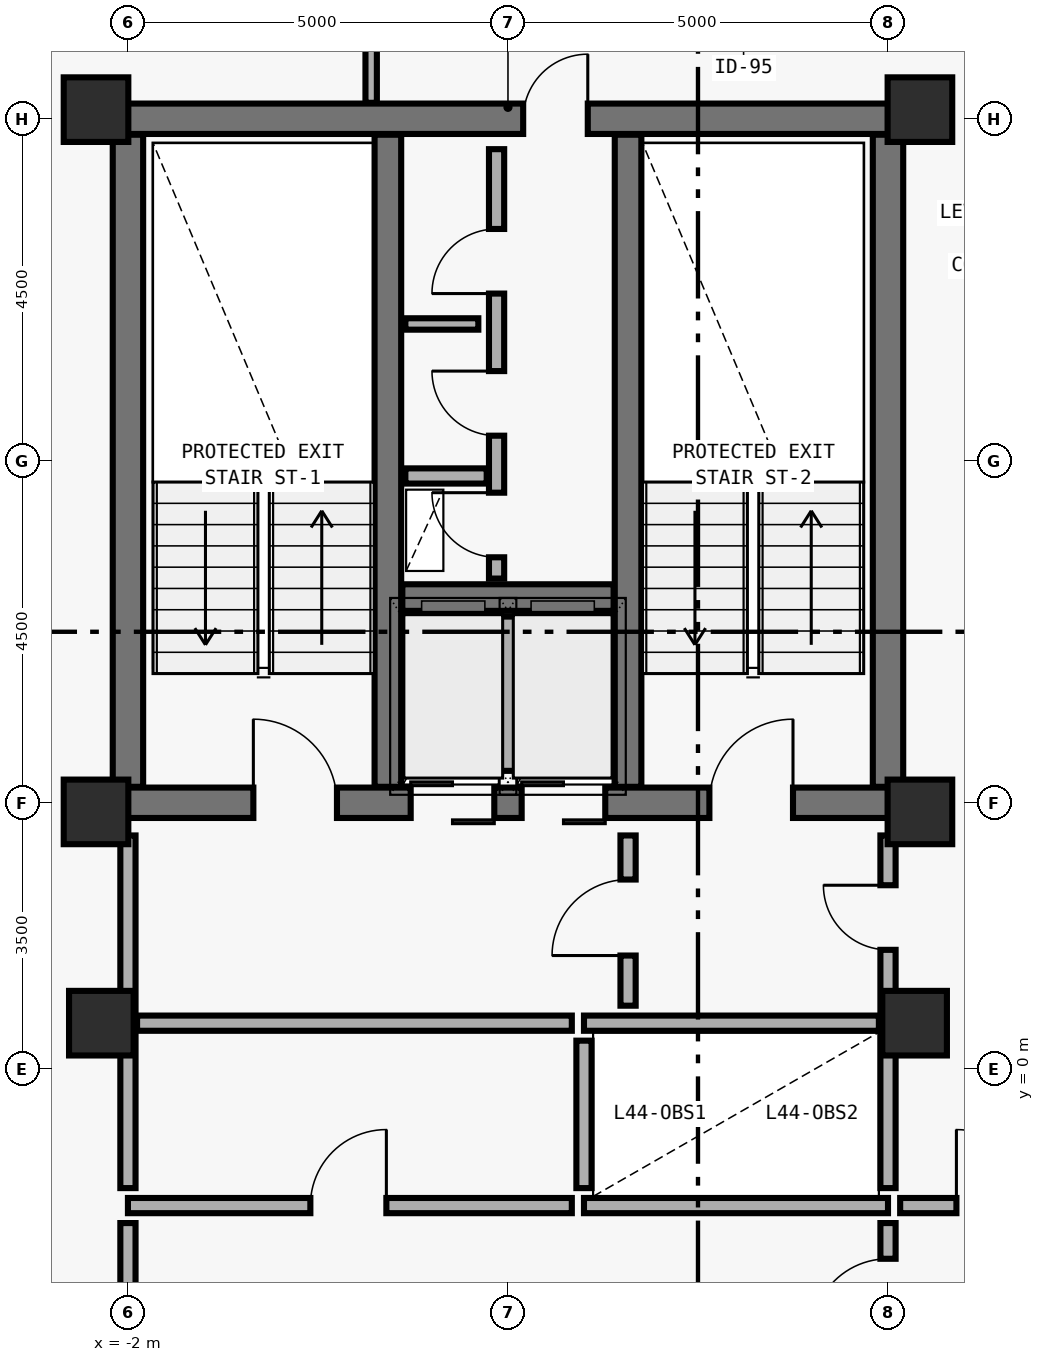
"""IFC4 building model, lengths in metres.
Left out: names, types, materials, properties, quantities, classifications, styles, units other than length and angle.
Written with IfcOpenShell. Run it as: python <this file> out.ifc"""

import sys

from ifc_helpers import new_model, si_unit, direction, frame, frame_2d, origin, origin_2d, place, context, subcontext, project, spatial, rectangle, extrude, element, fill, save


model = new_model("IFC4")
c1 = context("Model", 3, precision=1e-05, world=origin(), true_north=direction((0.0, 1.0)))
c2 = subcontext(c1, "Body", "Model", "MODEL_VIEW")
j1 = project(units=[si_unit("LENGTHUNIT", "METRE"), si_unit("PLANEANGLEUNIT", "RADIAN")], contexts=[c1])
p1 = place(None, origin())
s1 = spatial("IfcSite", under=j1, at=p1, CompositionType="ELEMENT")
p2 = place(p1, origin())
s2 = spatial("IfcBuilding", under=s1, at=p2, CompositionType="ELEMENT")
p3 = place(p2, frame((0.0, 0.0, 178.8)))
s3 = spatial("IfcBuildingStorey", under=s2, at=p3, CompositionType="ELEMENT", Elevation=178.8)
p4 = place(p3, frame((-2.0, 3.5, 0.0), z_axis=(0.0, 0.0, 1.0), x_axis=(1.0, 0.0, 0.0)))
e1 = element("IfcWall", 1, at=p4, inside=s3, PredefinedType="SHEAR", context=c2, shape_type="SweptSolid", body=[
    extrude(rectangle(XDim=10.0, YDim=0.4, at=frame_2d((5.0, 0.0))), origin(), (0.0, 0.0, 1.0), 3.592),
])
p5 = place(p4, frame((1.65, 0.0, 0.0)))
e2 = element("IfcOpeningElement", 2, at=p5, cuts=e1, PredefinedType="OPENING", context=c2, shape_type="SweptSolid", body=[
    extrude(rectangle(XDim=1.1, YDim=2.15, at=frame_2d((0.55, 1.075))), frame((0.0, 0.21, 0.0), z_axis=(0.0, -1.0, 0.0), x_axis=(1.0, 0.0, 0.0)), (0.0, 0.0, 1.0), 0.42),
])
p6 = place(p4, frame((7.65, 0.0, 0.0)))
e3 = element("IfcOpeningElement", 3, at=p6, cuts=e1, PredefinedType="OPENING", context=c2, shape_type="SweptSolid", body=[
    extrude(rectangle(XDim=1.1, YDim=2.15, at=frame_2d((0.55, 1.075))), frame((0.0, 0.21, 0.0), z_axis=(0.0, -1.0, 0.0), x_axis=(1.0, 0.0, 0.0)), (0.0, 0.0, 1.0), 0.42),
])
p7 = place(p4, frame((3.72, 0.0, 0.0)))
e4 = element("IfcOpeningElement", 4, at=p7, cuts=e1, PredefinedType="OPENING", context=c2, shape_type="SweptSolid", body=[
    extrude(rectangle(XDim=1.1, YDim=2.2, at=frame_2d((0.55, 1.1))), frame((0.0, 0.21, 0.0), z_axis=(0.0, -1.0, 0.0), x_axis=(1.0, 0.0, 0.0)), (0.0, 0.0, 1.0), 0.42),
])
p8 = place(p4, frame((5.18, 0.0, 0.0)))
e5 = element("IfcOpeningElement", 5, at=p8, cuts=e1, PredefinedType="OPENING", context=c2, shape_type="SweptSolid", body=[
    extrude(rectangle(XDim=1.1, YDim=2.2, at=frame_2d((0.55, 1.1))), frame((0.0, 0.21, 0.0), z_axis=(0.0, -1.0, 0.0), x_axis=(1.0, 0.0, 0.0)), (0.0, 0.0, 1.0), 0.42),
])
p9 = place(p3, frame((-2.0, 12.5, 0.0), z_axis=(0.0, 0.0, 1.0), x_axis=(1.0, 0.0, 0.0)))
e6 = element("IfcWall", 6, at=p9, inside=s3, PredefinedType="SHEAR", context=c2, shape_type="SweptSolid", body=[
    extrude(rectangle(XDim=10.0, YDim=0.4, at=frame_2d((5.0, 0.0))), origin(), (0.0, 0.0, 1.0), 3.592),
])
p10 = place(p9, frame((5.2, 0.0, 0.0)))
e7 = element("IfcOpeningElement", 7, at=p10, cuts=e6, PredefinedType="OPENING", context=c2, shape_type="SweptSolid", body=[
    extrude(rectangle(XDim=0.85, YDim=2.1, at=frame_2d((0.425, 1.05))), frame((0.0, 0.21, 0.0), z_axis=(0.0, -1.0, 0.0), x_axis=(1.0, 0.0, 0.0)), (0.0, 0.0, 1.0), 0.42),
])
for number, where, z_axis, x_axis in (
    (8, (-2.0, 3.71, 0.0), (0.0, 0.0, 1.0), (0.0, 1.0, 0.0)),
    (9, (8.0, 3.71, 0.0), (0.0, 0.0, 1.0), (0.0, 1.0, 0.0)),
):
    element("IfcWall", number, at=place(p3, frame(where, z_axis=z_axis, x_axis=x_axis)), inside=s3, PredefinedType="SHEAR", context=c2, shape_type="SweptSolid", body=[
        extrude(rectangle(XDim=8.58, YDim=0.4, at=frame_2d((4.29, 0.0))), origin(), (0.0, 0.0, 1.0), 3.592),
    ])
for number, where, z_axis, x_axis in (
    (10, (1.42, 3.71, 0.0), (0.0, 0.0, 1.0), (0.0, 1.0, 0.0)),
    (11, (4.58, 3.71, 0.0), (0.0, 0.0, 1.0), (0.0, 1.0, 0.0)),
):
    element("IfcWall", number, at=place(p3, frame(where, z_axis=z_axis, x_axis=x_axis)), inside=s3, PredefinedType="SHEAR", context=c2, shape_type="SweptSolid", body=[
        extrude(rectangle(XDim=8.58, YDim=0.35, at=frame_2d((4.29, 0.0))), origin(), (0.0, 0.0, 1.0), 3.592),
    ])
p11 = place(p3, frame((1.61, 6.2, 0.0), z_axis=(0.0, 0.0, 1.0), x_axis=(1.0, 0.0, 0.0)))
e12 = element("IfcWall", 12, at=p11, inside=s3, PredefinedType="SHEAR", context=c2, shape_type="SweptSolid", body=[
    extrude(rectangle(XDim=2.78, YDim=0.35, at=frame_2d((1.39, 0.0))), origin(), (0.0, 0.0, 1.0), 3.592),
])
for number, where, z_axis, x_axis in (
    (13, (-2.42, 12.62, 0.0), (0.0, 0.0, 1.0), (1.0, 0.0, 0.0)),
    (14, (8.42, 12.62, 0.0), (0.0, 0.0, 1.0), (1.0, 0.0, 0.0)),
    (15, (-2.42, 3.38, 0.0), (0.0, 0.0, 1.0), (1.0, 0.0, 0.0)),
    (16, (8.42, 3.38, 0.0), (0.0, 0.0, 1.0), (1.0, 0.0, 0.0)),
    (17, (-2.35, 0.6, 0.0), (0.0, 0.0, 1.0), (1.0, 0.0, 0.0)),
    (18, (8.35, 0.6, 0.0), (0.0, 0.0, 1.0), (1.0, 0.0, 0.0)),
):
    element("IfcColumn", number, at=place(p3, frame(where, z_axis=z_axis, x_axis=x_axis)), inside=s3, PredefinedType="COLUMN", context=c2, shape_type="SweptSolid", body=[
        extrude(rectangle(XDim=0.85, YDim=0.85, at=origin_2d()), origin(), (0.0, 0.0, 1.0), 3.575),
    ])
p12 = place(p3, frame((3.0, 3.92, 0.0), z_axis=(0.0, 0.0, 1.0), x_axis=(0.0, 1.0, 0.0)))
e19 = element("IfcWall", 19, at=p12, inside=s3, PredefinedType="SOLIDWALL", context=c2, shape_type="SweptSolid", body=[
    extrude(rectangle(XDim=2.03, YDim=0.2, at=frame_2d((1.015, 0.0))), origin(), (0.0, 0.0, 1.0), 3.36),
])
p13 = place(p3, frame((1.65, 7.8, 0.0), z_axis=(0.0, 0.0, 1.0), x_axis=(1.0, 0.0, 0.0)))
e20 = element("IfcWall", 20, at=p13, inside=s3, PredefinedType="SOLIDWALL", context=c2, shape_type="SweptSolid", body=[
    extrude(rectangle(XDim=1.07, YDim=0.2, at=frame_2d((0.535, 0.0))), origin(), (0.0, 0.0, 1.0), 3.36),
])
p14 = place(p3, frame((4.0, 0.6, 0.0), z_axis=(0.0, 0.0, 1.0), x_axis=(1.0, 0.0, 0.0)))
e21 = element("IfcWall", 21, at=p14, inside=s3, PredefinedType="SOLIDWALL", context=c2, shape_type="SweptSolid", body=[
    extrude(rectangle(XDim=3.88, YDim=0.2, at=frame_2d((1.94, 0.0))), origin(), (0.0, 0.0, 1.0), 3.012),
])
p15 = place(p3, frame((4.0, -1.8, 0.0), z_axis=(0.0, 0.0, 1.0), x_axis=(1.0, 0.0, 0.0)))
e22 = element("IfcWall", 22, at=p15, inside=s3, PredefinedType="SOLIDWALL", context=c2, shape_type="SweptSolid", body=[
    extrude(rectangle(XDim=4.0, YDim=0.2, at=frame_2d((2.0, 0.0))), origin(), (0.0, 0.0, 1.0), 3.36),
])
p16 = place(p3, frame((4.0, -1.57, 0.0), z_axis=(0.0, 0.0, 1.0), x_axis=(0.0, 1.0, 0.0)))
e23 = element("IfcWall", 23, at=p16, inside=s3, PredefinedType="SOLIDWALL", context=c2, shape_type="SweptSolid", body=[
    extrude(rectangle(XDim=1.94, YDim=0.2, at=frame_2d((0.97, 0.0))), origin(), (0.0, 0.0, 1.0), 3.36),
])
p17 = place(p3, frame((8.0, -1.57, 0.0), z_axis=(0.0, 0.0, 1.0), x_axis=(0.0, 1.0, 0.0)))
e24 = element("IfcWall", 24, at=p17, inside=s3, PredefinedType="SOLIDWALL", context=c2, shape_type="SweptSolid", body=[
    extrude(rectangle(XDim=2.05, YDim=0.2, at=frame_2d((1.025, 0.0))), origin(), (0.0, 0.0, 1.0), 3.012),
])
p18 = place(p3, frame((2.85, 6.45, 0.0), z_axis=(0.0, 0.0, 1.0), x_axis=(0.0, 1.0, 0.0)))
e25 = element("IfcWall", 25, at=p18, inside=s3, PredefinedType="MOVABLE", context=c2, shape_type="SweptSolid", body=[
    extrude(rectangle(XDim=5.65, YDim=0.2, at=frame_2d((2.825, 0.0))), origin(), (0.0, 0.0, 1.0), 3.36),
])
p19 = place(p18, frame((1.88, 0.0, 0.0)))
e26 = element("IfcOpeningElement", 26, at=p19, cuts=e25, PredefinedType="OPENING", context=c2, shape_type="SweptSolid", body=[
    extrude(rectangle(XDim=0.85, YDim=2.05, at=frame_2d((0.425, 1.025))), frame((0.0, 0.11, 0.0), z_axis=(0.0, -1.0, 0.0), x_axis=(1.0, 0.0, 0.0)), (0.0, 0.0, 1.0), 0.22),
])
p20 = place(p18, frame((3.75, 0.0, 0.0)))
e27 = element("IfcOpeningElement", 27, at=p20, cuts=e25, PredefinedType="OPENING", context=c2, shape_type="SweptSolid", body=[
    extrude(rectangle(XDim=0.85, YDim=2.1, at=frame_2d((0.425, 1.05))), frame((0.0, 0.11, 0.0), z_axis=(0.0, -1.0, 0.0), x_axis=(1.0, 0.0, 0.0)), (0.0, 0.0, 1.0), 0.22),
])
p21 = place(p18, frame((0.28, 0.0, 0.0)))
e28 = element("IfcOpeningElement", 28, at=p21, cuts=e25, PredefinedType="OPENING", context=c2, shape_type="SweptSolid", body=[
    extrude(rectangle(XDim=0.85, YDim=2.1, at=frame_2d((0.425, 1.05))), frame((0.0, 0.11, 0.0), z_axis=(0.0, -1.0, 0.0), x_axis=(1.0, 0.0, 0.0)), (0.0, 0.0, 1.0), 0.22),
])
p22 = place(p3, frame((4.58, 0.83, 0.0), z_axis=(0.0, 0.0, 1.0), x_axis=(0.0, 1.0, 0.0)))
e29 = element("IfcWall", 29, at=p22, inside=s3, PredefinedType="MOVABLE", context=c2, shape_type="SweptSolid", body=[
    extrude(rectangle(XDim=2.24, YDim=0.2, at=frame_2d((1.12, 0.0))), origin(), (0.0, 0.0, 1.0), 3.36),
])
p23 = place(p22, frame((0.66, 0.0, 0.0)))
e30 = element("IfcOpeningElement", 30, at=p23, cuts=e29, PredefinedType="OPENING", context=c2, shape_type="SweptSolid", body=[
    extrude(rectangle(XDim=1.0, YDim=2.1, at=frame_2d((0.5, 1.05))), frame((0.0, 0.11, 0.0), z_axis=(0.0, -1.0, 0.0), x_axis=(1.0, 0.0, 0.0)), (0.0, 0.0, 1.0), 0.22),
])
p24 = place(p3, frame((8.0, 0.72, 0.0), z_axis=(0.0, 0.0, 1.0), x_axis=(0.0, 1.0, 0.0)))
e31 = element("IfcWall", 31, at=p24, inside=s3, PredefinedType="MOVABLE", context=c2, shape_type="SweptSolid", body=[
    extrude(rectangle(XDim=2.35, YDim=0.2, at=frame_2d((1.175, 0.0))), origin(), (0.0, 0.0, 1.0), 2.692),
])
p25 = place(p24, frame((0.845, 0.0, 0.0)))
e32 = element("IfcOpeningElement", 32, at=p25, cuts=e31, PredefinedType="OPENING", context=c2, shape_type="SweptSolid", body=[
    extrude(rectangle(XDim=0.85, YDim=2.1, at=frame_2d((0.425, 1.05))), frame((0.0, 0.11, 0.0), z_axis=(0.0, -1.0, 0.0), x_axis=(1.0, 0.0, 0.0)), (0.0, 0.0, 1.0), 0.22),
])
p26 = place(p3, frame((8.0, -3.97, 0.0), z_axis=(0.0, 0.0, 1.0), x_axis=(0.0, 1.0, 0.0)))
e33 = element("IfcWall", 33, at=p26, inside=s3, PredefinedType="MOVABLE", context=c2, shape_type="SweptSolid", body=[
    extrude(rectangle(XDim=1.94, YDim=0.2, at=frame_2d((0.97, 0.0))), origin(), (0.0, 0.0, 1.0), 3.012),
])
p27 = place(p26, frame((0.47, 0.0, 0.0)))
e34 = element("IfcOpeningElement", 34, at=p27, cuts=e33, PredefinedType="OPENING", context=c2, shape_type="SweptSolid", body=[
    extrude(rectangle(XDim=1.0, YDim=2.1, at=frame_2d((0.5, 1.05))), frame((0.0, 0.11, 0.0), z_axis=(0.0, -1.0, 0.0), x_axis=(1.0, 0.0, 0.0)), (0.0, 0.0, 1.0), 0.22),
])
p28 = place(p3, frame((-2.0, -1.8, 0.0), z_axis=(0.0, 0.0, 1.0), x_axis=(1.0, 0.0, 0.0)))
e35 = element("IfcWall", 35, at=p28, inside=s3, PredefinedType="MOVABLE", context=c2, shape_type="SweptSolid", body=[
    extrude(rectangle(XDim=5.84, YDim=0.2, at=frame_2d((2.92, 0.0))), origin(), (0.0, 0.0, 1.0), 3.36),
])
p29 = place(p28, frame((2.4, 0.0, 0.0)))
e36 = element("IfcOpeningElement", 36, at=p29, cuts=e35, PredefinedType="OPENING", context=c2, shape_type="SweptSolid", body=[
    extrude(rectangle(XDim=1.0, YDim=2.1, at=frame_2d((0.5, 1.05))), frame((0.0, 0.11, 0.0), z_axis=(0.0, -1.0, 0.0), x_axis=(1.0, 0.0, 0.0)), (0.0, 0.0, 1.0), 0.22),
])
p30 = place(p3, frame((8.16, -1.8, 0.0), z_axis=(0.0, 0.0, 1.0), x_axis=(1.0, 0.0, 0.0)))
e37 = element("IfcWall", 37, at=p30, inside=s3, PredefinedType="MOVABLE", context=c2, shape_type="SweptSolid", body=[
    extrude(rectangle(XDim=2.64, YDim=0.2, at=frame_2d((1.32, 0.0))), origin(), (0.0, 0.0, 1.0), 3.36),
])
p31 = place(p30, frame((0.74, 0.0, 0.0)))
e38 = element("IfcOpeningElement", 38, at=p31, cuts=e37, PredefinedType="OPENING", context=c2, shape_type="SweptSolid", body=[
    extrude(rectangle(XDim=1.0, YDim=2.1, at=frame_2d((0.5, 1.05))), frame((0.0, 0.11, 0.0), z_axis=(0.0, -1.0, 0.0), x_axis=(1.0, 0.0, 0.0)), (0.0, 0.0, 1.0), 0.22),
])
p32 = place(p3, frame((1.65, 9.8, 0.0), z_axis=(0.0, 0.0, 1.0), x_axis=(1.0, 0.0, 0.0)))
e39 = element("IfcWall", 39, at=p32, inside=s3, PredefinedType="PARTITIONING", context=c2, shape_type="SweptSolid", body=[
    extrude(rectangle(XDim=0.96, YDim=0.15, at=frame_2d((0.48, 0.0))), origin(), (0.0, 0.0, 1.0), 3.36),
])
p33 = place(p3, frame((-1.88, 0.6, 0.0), z_axis=(0.0, 0.0, 1.0), x_axis=(1.0, 0.0, 0.0)))
e40 = element("IfcWall", 40, at=p33, inside=s3, PredefinedType="MOVABLE", context=c2, shape_type="SweptSolid", body=[
    extrude(rectangle(XDim=5.72, YDim=0.2, at=frame_2d((2.86, 0.0))), origin(), (0.0, 0.0, 1.0), 3.012),
])
p34 = place(p3, frame((-2.0, 0.72, 0.0), z_axis=(0.0, 0.0, 1.0), x_axis=(0.0, 1.0, 0.0)))
e41 = element("IfcWall", 41, at=p34, inside=s3, PredefinedType="MOVABLE", context=c2, shape_type="SweptSolid", body=[
    extrude(rectangle(XDim=2.35, YDim=0.2, at=frame_2d((1.175, 0.0))), origin(), (0.0, 0.0, 1.0), 2.692),
])
p35 = place(p3, frame((-2.0, -3.97, 0.0), z_axis=(0.0, 0.0, 1.0), x_axis=(0.0, 1.0, 0.0)))
e42 = element("IfcWall", 42, at=p35, inside=s3, PredefinedType="MOVABLE", context=c2, shape_type="SweptSolid", body=[
    extrude(rectangle(XDim=1.94, YDim=0.2, at=frame_2d((0.97, 0.0))), origin(), (0.0, 0.0, 1.0), 3.012),
])
p36 = place(p3, frame((-2.0, -1.57, 0.0), z_axis=(0.0, 0.0, 1.0), x_axis=(0.0, 1.0, 0.0)))
e43 = element("IfcWall", 43, at=p36, inside=s3, PredefinedType="MOVABLE", context=c2, shape_type="SweptSolid", body=[
    extrude(rectangle(XDim=2.05, YDim=0.2, at=frame_2d((1.025, 0.0))), origin(), (0.0, 0.0, 1.0), 3.012),
])
p37 = place(p3, frame((1.2, 14.615, 0.0), z_axis=(0.0, 0.0, 1.0), x_axis=(0.0, -1.0, 0.0)))
e44 = element("IfcWall", 44, at=p37, inside=s3, PredefinedType="PARTITIONING", context=c2, shape_type="SweptSolid", body=[
    extrude(rectangle(XDim=1.905, YDim=0.15, at=frame_2d((0.953, 0.0))), origin(), (0.0, 0.0, 1.0), 3.36),
])
p38 = place(p5, origin())
e45 = element("IfcDoor", 45, at=p38, inside=s3, OperationType="SINGLE_SWING_LEFT", PredefinedType="DOOR", context=c2, shape_type="SweptSolid", body=[
    extrude(rectangle(XDim=1.1, YDim=2.15, at=frame_2d((0.55, 1.075))), frame((0.0, 0.025, 0.0), z_axis=(0.0, -1.0, 0.0), x_axis=(1.0, 0.0, 0.0)), (0.0, 0.0, 1.0), 0.05),
])
fill(e2, e45)
p39 = place(p6, origin())
e46 = element("IfcDoor", 46, at=p39, inside=s3, OperationType="SINGLE_SWING_RIGHT", PredefinedType="DOOR", context=c2, shape_type="SweptSolid", body=[
    extrude(rectangle(XDim=1.1, YDim=2.15, at=frame_2d((0.55, 1.075))), frame((0.0, 0.025, 0.0), z_axis=(0.0, -1.0, 0.0), x_axis=(1.0, 0.0, 0.0)), (0.0, 0.0, 1.0), 0.05),
])
fill(e3, e46)
p40 = place(p7, origin())
e47 = element("IfcDoor", 47, at=p40, inside=s3, OperationType="DOUBLE_DOOR_SLIDING", PredefinedType="DOOR", context=c2, shape_type="SweptSolid", body=[
    extrude(rectangle(XDim=1.1, YDim=2.2, at=frame_2d((0.55, 1.1))), frame((0.0, 0.025, 0.0), z_axis=(0.0, -1.0, 0.0), x_axis=(1.0, 0.0, 0.0)), (0.0, 0.0, 1.0), 0.05),
])
fill(e4, e47)
p41 = place(p8, origin())
e48 = element("IfcDoor", 48, at=p41, inside=s3, OperationType="DOUBLE_DOOR_SLIDING", PredefinedType="DOOR", context=c2, shape_type="SweptSolid", body=[
    extrude(rectangle(XDim=1.1, YDim=2.2, at=frame_2d((0.55, 1.1))), frame((0.0, 0.025, 0.0), z_axis=(0.0, -1.0, 0.0), x_axis=(1.0, 0.0, 0.0)), (0.0, 0.0, 1.0), 0.05),
])
fill(e5, e48)
p42 = place(p10, origin())
e49 = element("IfcDoor", 49, at=p42, inside=s3, OperationType="SINGLE_SWING_RIGHT", PredefinedType="DOOR", context=c2, shape_type="SweptSolid", body=[
    extrude(rectangle(XDim=0.85, YDim=2.1, at=frame_2d((0.425, 1.05))), frame((0.0, 0.025, 0.0), z_axis=(0.0, -1.0, 0.0), x_axis=(1.0, 0.0, 0.0)), (0.0, 0.0, 1.0), 0.05),
])
fill(e7, e49)
p43 = place(p19, origin())
e50 = element("IfcDoor", 50, at=p43, inside=s3, OperationType="SINGLE_SWING_RIGHT", PredefinedType="DOOR", context=c2, shape_type="SweptSolid", body=[
    extrude(rectangle(XDim=0.85, YDim=2.05, at=frame_2d((0.425, 1.025))), frame((0.0, 0.025, 0.0), z_axis=(0.0, -1.0, 0.0), x_axis=(1.0, 0.0, 0.0)), (0.0, 0.0, 1.0), 0.05),
])
fill(e26, e50)
p44 = place(p20, origin())
e51 = element("IfcDoor", 51, at=p44, inside=s3, OperationType="SINGLE_SWING_LEFT", PredefinedType="DOOR", context=c2, shape_type="SweptSolid", body=[
    extrude(rectangle(XDim=0.85, YDim=2.1, at=frame_2d((0.425, 1.05))), frame((0.0, 0.025, 0.0), z_axis=(0.0, -1.0, 0.0), x_axis=(1.0, 0.0, 0.0)), (0.0, 0.0, 1.0), 0.05),
])
fill(e27, e51)
p45 = place(p21, origin())
e52 = element("IfcDoor", 52, at=p45, inside=s3, OperationType="SINGLE_SWING_RIGHT", PredefinedType="DOOR", context=c2, shape_type="SweptSolid", body=[
    extrude(rectangle(XDim=0.85, YDim=2.1, at=frame_2d((0.425, 1.05))), frame((0.0, 0.025, 0.0), z_axis=(0.0, -1.0, 0.0), x_axis=(1.0, 0.0, 0.0)), (0.0, 0.0, 1.0), 0.05),
])
fill(e28, e52)
p46 = place(p23, origin())
e53 = element("IfcDoor", 53, at=p46, inside=s3, OperationType="SINGLE_SWING_LEFT", PredefinedType="DOOR", context=c2, shape_type="SweptSolid", body=[
    extrude(rectangle(XDim=1.0, YDim=2.1, at=frame_2d((0.5, 1.05))), frame((0.0, 0.025, 0.0), z_axis=(0.0, -1.0, 0.0), x_axis=(1.0, 0.0, 0.0)), (0.0, 0.0, 1.0), 0.05),
])
fill(e30, e53)
p47 = place(p25, origin())
e54 = element("IfcDoor", 54, at=p47, inside=s3, OperationType="SINGLE_SWING_RIGHT", PredefinedType="DOOR", context=c2, shape_type="SweptSolid", body=[
    extrude(rectangle(XDim=0.85, YDim=2.1, at=frame_2d((0.425, 1.05))), frame((0.0, 0.025, 0.0), z_axis=(0.0, -1.0, 0.0), x_axis=(1.0, 0.0, 0.0)), (0.0, 0.0, 1.0), 0.05),
])
fill(e32, e54)
p48 = place(p27, origin())
e55 = element("IfcDoor", 55, at=p48, inside=s3, OperationType="SINGLE_SWING_LEFT", PredefinedType="DOOR", context=c2, shape_type="SweptSolid", body=[
    extrude(rectangle(XDim=1.0, YDim=2.1, at=frame_2d((0.5, 1.05))), frame((0.0, 0.025, 0.0), z_axis=(0.0, -1.0, 0.0), x_axis=(1.0, 0.0, 0.0)), (0.0, 0.0, 1.0), 0.05),
])
fill(e34, e55)
p49 = place(p29, origin())
e56 = element("IfcDoor", 56, at=p49, inside=s3, OperationType="SINGLE_SWING_RIGHT", PredefinedType="DOOR", context=c2, shape_type="SweptSolid", body=[
    extrude(rectangle(XDim=1.0, YDim=2.1, at=frame_2d((0.5, 1.05))), frame((0.0, 0.025, 0.0), z_axis=(0.0, -1.0, 0.0), x_axis=(1.0, 0.0, 0.0)), (0.0, 0.0, 1.0), 0.05),
])
fill(e36, e56)
p50 = place(p31, origin())
e57 = element("IfcDoor", 57, at=p50, inside=s3, OperationType="SINGLE_SWING_LEFT", PredefinedType="DOOR", context=c2, shape_type="SweptSolid", body=[
    extrude(rectangle(XDim=1.0, YDim=2.1, at=frame_2d((0.5, 1.05))), frame((0.0, 0.025, 0.0), z_axis=(0.0, -1.0, 0.0), x_axis=(1.0, 0.0, 0.0)), (0.0, 0.0, 1.0), 0.05),
])
fill(e38, e57)
save(model, sys.argv[1])
